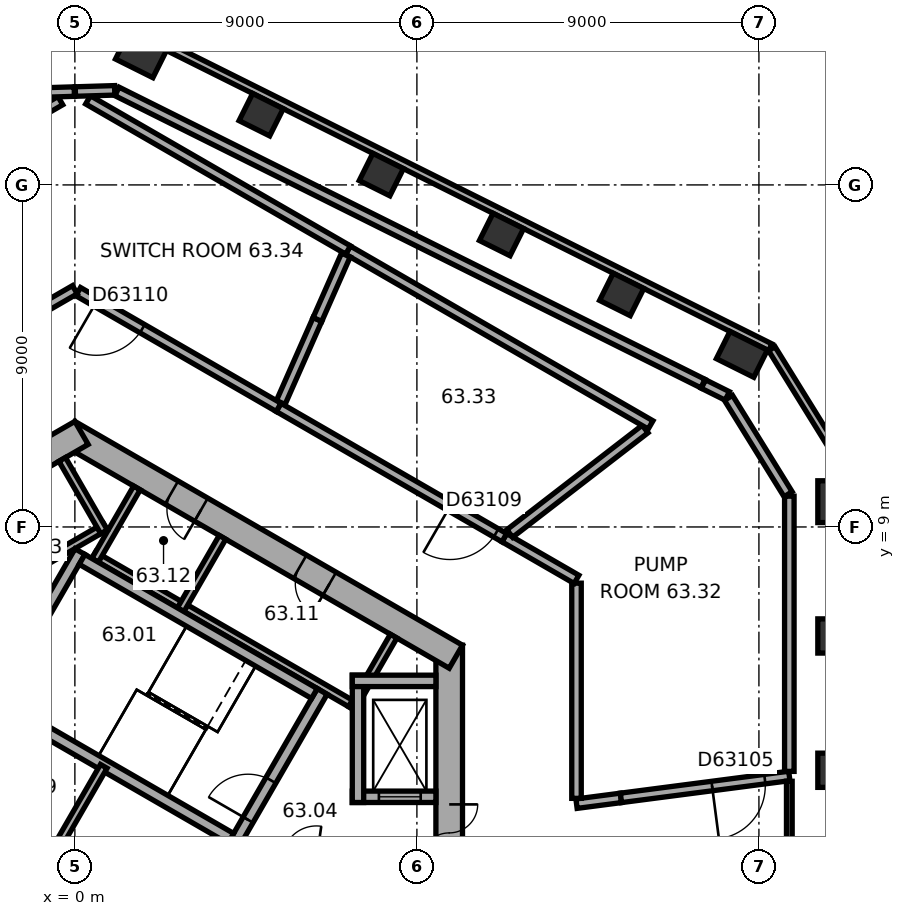
"""IFC4 building model, lengths in metres.
Left out: names, types, materials, properties, quantities, classifications, styles, units other than length and angle.
Written with IfcOpenShell. Run it as: python <this file> out.ifc"""

import sys

from ifc_helpers import new_model, si_unit, direction, frame, frame_2d, origin, origin_2d, place, context, subcontext, project, spatial, rectangle, extrude, element, fill, save


model = new_model("IFC4")
c1 = context("Model", 3, precision=1e-05, world=origin(), true_north=direction((0.0, 1.0)))
c2 = subcontext(c1, "Body", "Model", "MODEL_VIEW")
j1 = project(units=[si_unit("LENGTHUNIT", "METRE"), si_unit("PLANEANGLEUNIT", "RADIAN")], contexts=[c1])
p1 = place(None, origin())
s1 = spatial("IfcSite", under=j1, at=p1, CompositionType="ELEMENT")
p2 = place(p1, origin())
s2 = spatial("IfcBuilding", under=s1, at=p2, CompositionType="ELEMENT")
p3 = place(p2, frame((0.0, 0.0, 255.0)))
s3 = spatial("IfcBuildingStorey", under=s2, at=p3, CompositionType="ELEMENT", Elevation=255.0)
for number, where, z_axis, x_axis in (
    (1, (19.95, 2.598, 0.0), (0.0, 0.0, 1.0), (0.0, 1.0, 0.0)),
    (2, (19.95, 6.132, 0.0), (0.0, 0.0, 1.0), (0.0, 1.0, 0.0)),
):
    element("IfcColumn", number, at=place(p3, frame(where, z_axis=z_axis, x_axis=x_axis)), inside=s3, PredefinedType="COLUMN", context=c2, shape_type="SweptSolid", body=[
        extrude(rectangle(XDim=0.9, YDim=0.8, at=origin_2d()), origin(), (0.0, 0.0, 1.0), 4.8),
    ])
for number, where, z_axis, x_axis in (
    (3, (19.95, 9.665, 0.0), (0.0, 0.0, 1.0), (0.0, 1.0, 0.0)),
    (4, (17.552, 13.541, 0.0), (0.0, 0.0, 1.0), (-0.895, 0.446, 0.0)),
):
    element("IfcColumn", number, at=place(p3, frame(where, z_axis=z_axis, x_axis=x_axis)), inside=s3, PredefinedType="COLUMN", context=c2, shape_type="SweptSolid", body=[
        extrude(rectangle(XDim=1.1, YDim=0.8, at=origin_2d()), origin(), (0.0, 0.0, 1.0), 4.8),
    ])
for number, where, z_axis, x_axis in (
    (5, (14.389, 15.118, 0.0), (0.0, 0.0, 1.0), (-0.895, 0.446, 0.0)),
    (6, (11.227, 16.695, 0.0), (0.0, 0.0, 1.0), (-0.895, 0.446, 0.0)),
    (7, (8.064, 18.271, 0.0), (0.0, 0.0, 1.0), (-0.895, 0.446, 0.0)),
    (8, (4.902, 19.848, 0.0), (0.0, 0.0, 1.0), (-0.895, 0.446, 0.0)),
):
    element("IfcColumn", number, at=place(p3, frame(where, z_axis=z_axis, x_axis=x_axis)), inside=s3, PredefinedType="COLUMN", context=c2, shape_type="SweptSolid", body=[
        extrude(rectangle(XDim=0.9, YDim=0.8, at=origin_2d()), origin(), (0.0, 0.0, 1.0), 4.8),
    ])
p4 = place(p3, frame((1.74, 21.425, 0.0), z_axis=(0.0, 0.0, 1.0), x_axis=(-0.894934361602, 0.44619781311, 0.0)))
e9 = element("IfcColumn", 9, at=p4, inside=s3, PredefinedType="COLUMN", context=c2, shape_type="SweptSolid", body=[
    extrude(rectangle(XDim=1.1, YDim=0.8, at=origin_2d()), origin(), (0.0, 0.0, 1.0), 4.8),
])
p5 = place(p3, frame((9.85, -5.889, 0.0), z_axis=(0.0, 0.0, 1.0), x_axis=(0.0, 1.0, 0.0)))
e10 = element("IfcWall", 10, at=p5, inside=s3, PredefinedType="SHEAR", context=c2, shape_type="SweptSolid", body=[
    extrude(rectangle(XDim=11.778, YDim=0.7, at=frame_2d((5.889, 0.0))), origin(), (0.0, 0.0, 1.0), 4.8),
])
p6 = place(p5, frame((6.089, 0.0, 0.0)))
e11 = element("IfcOpeningElement", 11, at=p6, cuts=e10, PredefinedType="OPENING", context=c2, shape_type="SweptSolid", body=[
    extrude(rectangle(XDim=1.5, YDim=2.1, at=frame_2d((0.75, 1.05))), frame((0.0, 0.36, 0.0), z_axis=(0.0, -1.0, 0.0), x_axis=(1.0, 0.0, 0.0)), (0.0, 0.0, 1.0), 0.72),
])
p7 = place(p5, frame((2.939, 0.0, 0.0)))
e12 = element("IfcOpeningElement", 12, at=p7, cuts=e10, PredefinedType="OPENING", context=c2, shape_type="SweptSolid", body=[
    extrude(rectangle(XDim=0.9, YDim=2.1, at=frame_2d((0.45, 1.05))), frame((0.0, 0.36, 0.0), z_axis=(0.0, -1.0, 0.0), x_axis=(1.0, 0.0, 0.0)), (0.0, 0.0, 1.0), 0.72),
])
p8 = place(p3, frame((10.025, 5.586, 0.0), z_axis=(0.0, 0.0, 1.0), x_axis=(-0.866026453023, 0.499998182661, 0.0)))
e13 = element("IfcWall", 13, at=p8, inside=s3, PredefinedType="SHEAR", context=c2, shape_type="SweptSolid", body=[
    extrude(rectangle(XDim=11.778, YDim=0.7, at=frame_2d((5.889, 0.0))), origin(), (0.0, 0.0, 1.0), 4.8),
])
p9 = place(p8, frame((3.839, 0.0, 0.0)))
e14 = element("IfcOpeningElement", 14, at=p9, cuts=e13, PredefinedType="OPENING", context=c2, shape_type="SweptSolid", body=[
    extrude(rectangle(XDim=0.9, YDim=2.1, at=frame_2d((0.45, 1.05))), frame((0.0, 0.36, 0.0), z_axis=(0.0, -1.0, 0.0), x_axis=(1.0, 0.0, 0.0)), (0.0, 0.0, 1.0), 0.72),
])
p10 = place(p8, frame((7.739, 0.0, 0.0)))
e15 = element("IfcOpeningElement", 15, at=p10, cuts=e13, PredefinedType="OPENING", context=c2, shape_type="SweptSolid", body=[
    extrude(rectangle(XDim=0.9, YDim=2.1, at=frame_2d((0.45, 1.05))), frame((0.0, 0.36, 0.0), z_axis=(0.0, -1.0, 0.0), x_axis=(1.0, 0.0, 0.0)), (0.0, 0.0, 1.0), 0.72),
])
p11 = place(p3, frame((0.175, 11.475, 0.0), z_axis=(0.0, 0.0, 1.0), x_axis=(-0.866026453023, -0.499998182661, 0.0)))
e16 = element("IfcWall", 16, at=p11, inside=s3, PredefinedType="SHEAR", context=c2, shape_type="SweptSolid", body=[
    extrude(rectangle(XDim=11.778, YDim=0.7, at=frame_2d((5.889, 0.0))), origin(), (0.0, 0.0, 1.0), 4.8),
])
p12 = place(p11, frame((6.089, 0.0, 0.0)))
e17 = element("IfcOpeningElement", 17, at=p12, cuts=e16, PredefinedType="OPENING", context=c2, shape_type="SweptSolid", body=[
    extrude(rectangle(XDim=1.5, YDim=2.1, at=frame_2d((0.75, 1.05))), frame((0.0, 0.36, 0.0), z_axis=(0.0, -1.0, 0.0), x_axis=(1.0, 0.0, 0.0)), (0.0, 0.0, 1.0), 0.72),
])
p13 = place(p11, frame((1.639, 0.0, 0.0)))
e18 = element("IfcOpeningElement", 18, at=p13, cuts=e16, PredefinedType="OPENING", context=c2, shape_type="SweptSolid", body=[
    extrude(rectangle(XDim=0.9, YDim=2.1, at=frame_2d((0.45, 1.05))), frame((0.0, 0.36, 0.0), z_axis=(0.0, -1.0, 0.0), x_axis=(1.0, 0.0, 0.0)), (0.0, 0.0, 1.0), 0.72),
])
p14 = place(p11, frame((4.239, 0.0, 0.0)))
e19 = element("IfcOpeningElement", 19, at=p14, cuts=e16, PredefinedType="OPENING", context=c2, shape_type="SweptSolid", body=[
    extrude(rectangle(XDim=0.9, YDim=2.1, at=frame_2d((0.45, 1.05))), frame((0.0, 0.36, 0.0), z_axis=(0.0, -1.0, 0.0), x_axis=(1.0, 0.0, 0.0)), (0.0, 0.0, 1.0), 0.72),
])
p15 = place(p3, frame((20.435, 10.304, 0.0), z_axis=(0.0, 0.0, 1.0), x_axis=(-0.526202661606, 0.850359194058, 0.0)))
e20 = element("IfcWall", 20, at=p15, inside=s3, PredefinedType="STANDARD", context=c2, shape_type="SweptSolid", body=[
    extrude(rectangle(XDim=3.983, YDim=0.2, at=frame_2d((1.991, 0.0))), origin(), (0.0, 0.0, 1.0), 4.8),
])
p16 = place(p3, frame((18.299, 13.727, 0.0), z_axis=(0.0, 0.0, 1.0), x_axis=(-0.894934554817, 0.44619742558, 0.0)))
e21 = element("IfcWall", 21, at=p16, inside=s3, PredefinedType="STANDARD", context=c2, shape_type="SweptSolid", body=[
    extrude(rectangle(XDim=18.841, YDim=0.2, at=frame_2d((9.421, 0.0))), origin(), (0.0, 0.0, 1.0), 4.8),
])
p17 = place(p3, frame((7.424, 4.259, 0.0), z_axis=(0.0, 0.0, 1.0), x_axis=(-0.866026010844, 0.49999894854, 0.0)))
e22 = element("IfcWall", 22, at=p17, inside=s3, PredefinedType="PARTITIONING", context=c2, shape_type="SweptSolid", body=[
    extrude(rectangle(XDim=8.0, YDim=0.2, at=frame_2d((4.0, 0.0))), origin(), (0.0, 0.0, 1.0), 4.52),
])
for number, where, z_axis, x_axis in (
    (23, (7.287, 4.222, 0.0), (0.0, 0.0, 1.0), (0.5, 0.866, 0.0)),
    (24, (2.784, 6.822, 0.0), (0.0, 0.0, 1.0), (0.5, 0.866, 0.0)),
    (25, (0.532, 8.122, 0.0), (0.0, 0.0, 1.0), (0.5, 0.866, 0.0)),
):
    element("IfcWall", number, at=place(p3, frame(where, z_axis=z_axis, x_axis=x_axis)), inside=s3, PredefinedType="PARTITIONING", context=c2, shape_type="SweptSolid", body=[
        extrude(rectangle(XDim=2.2, YDim=0.2, at=frame_2d((1.1, 0.0))), origin(), (0.0, 0.0, 1.0), 4.52),
    ])
p18 = place(p3, frame((0.803, 9.009, 0.0), z_axis=(0.0, 0.0, 1.0), x_axis=(-0.866028230842, -0.499995103361, 0.0)))
e26 = element("IfcWall", 26, at=p18, inside=s3, PredefinedType="PARTITIONING", context=c2, shape_type="SweptSolid", body=[
    extrude(rectangle(XDim=5.4, YDim=0.2, at=frame_2d((2.7, 0.0))), origin(), (0.0, 0.0, 1.0), 4.52),
])
p19 = place(p3, frame((0.767, 8.872, 0.0), z_axis=(0.0, 0.0, 1.0), x_axis=(-0.499994660107, 0.866028486751, 0.0)))
e27 = element("IfcWall", 27, at=p19, inside=s3, PredefinedType="PARTITIONING", context=c2, shape_type="SweptSolid", body=[
    extrude(rectangle(XDim=2.2, YDim=0.2, at=frame_2d((1.1, 0.0))), origin(), (0.0, 0.0, 1.0), 4.52),
])
p20 = place(p3, frame((4.158, 0.602, 0.0), z_axis=(0.0, 0.0, 1.0), x_axis=(0.499977259774, 0.866038532462, 0.0)))
e28 = element("IfcWall", 28, at=p20, inside=s3, PredefinedType="SHEAR", context=c2, shape_type="SweptSolid", body=[
    extrude(rectangle(XDim=4.7, YDim=0.3, at=frame_2d((2.35, 0.0))), origin(), (0.0, 0.0, 1.0), 4.52),
])
p21 = place(p20, frame((0.8, 0.0, 0.0)))
e29 = element("IfcOpeningElement", 29, at=p21, cuts=e28, PredefinedType="OPENING", context=c2, shape_type="SweptSolid", body=[
    extrude(rectangle(XDim=1.2, YDim=2.1, at=frame_2d((0.6, 1.05))), frame((0.0, 0.16, 0.0), z_axis=(0.0, -1.0, 0.0), x_axis=(1.0, 0.0, 0.0)), (0.0, 0.0, 1.0), 0.32),
])
p22 = place(p3, frame((-2.216, 4.282, 0.0), z_axis=(0.0, 0.0, 1.0), x_axis=(0.499977259774, 0.866038532462, 0.0)))
e30 = element("IfcWall", 30, at=p22, inside=s3, PredefinedType="SHEAR", context=c2, shape_type="SweptSolid", body=[
    extrude(rectangle(XDim=4.7, YDim=0.3, at=frame_2d((2.35, 0.0))), origin(), (0.0, 0.0, 1.0), 4.52),
])
for number, where, z_axis, x_axis in (
    (31, (4.103, 0.807, 0.0), (0.0, 0.0, 1.0), (-0.866, 0.5, 0.0)),
    (32, (6.303, 4.617, 0.0), (0.0, 0.0, 1.0), (-0.866, 0.5, 0.0)),
):
    element("IfcWall", number, at=place(p3, frame(where, z_axis=z_axis, x_axis=x_axis)), inside=s3, PredefinedType="SHEAR", context=c2, shape_type="SweptSolid", body=[
        extrude(rectangle(XDim=7.06, YDim=0.3, at=frame_2d((3.53, 0.0))), origin(), (0.0, 0.0, 1.0), 4.52),
    ])
p23 = place(p3, frame((7.3, 1.9, 0.0), z_axis=(0.0, 0.0, 1.0), x_axis=(1.0, 0.0, 0.0)))
e33 = element("IfcWall", 33, at=p23, inside=s3, PredefinedType="SHEAR", context=c2, shape_type="SweptSolid", body=[
    extrude(rectangle(XDim=2.2, YDim=0.3, at=frame_2d((1.1, 0.0))), origin(), (0.0, 0.0, 1.0), 4.52),
])
p24 = place(p23, frame((0.7, 0.0, 0.0)))
e34 = element("IfcOpeningElement", 34, at=p24, cuts=e33, PredefinedType="OPENING", context=c2, shape_type="SweptSolid", body=[
    extrude(rectangle(XDim=1.1, YDim=2.1, at=frame_2d((0.55, 1.05))), frame((0.0, 0.16, 0.0), z_axis=(0.0, -1.0, 0.0), x_axis=(1.0, 0.0, 0.0)), (0.0, 0.0, 1.0), 0.32),
])
p25 = place(p3, frame((7.45, 1.75, 0.0), z_axis=(0.0, 0.0, 1.0), x_axis=(0.0, 1.0, 0.0)))
e35 = element("IfcWall", 35, at=p25, inside=s3, PredefinedType="SHEAR", context=c2, shape_type="SweptSolid", body=[
    extrude(rectangle(XDim=3.35, YDim=0.3, at=frame_2d((1.675, 0.0))), origin(), (0.0, 0.0, 1.0), 4.52),
])
p26 = place(p3, frame((7.3, 4.95, 0.0), z_axis=(0.0, 0.0, 1.0), x_axis=(1.0, 0.0, 0.0)))
e36 = element("IfcWall", 36, at=p26, inside=s3, PredefinedType="SHEAR", context=c2, shape_type="SweptSolid", body=[
    extrude(rectangle(XDim=2.2, YDim=0.3, at=frame_2d((1.1, 0.0))), origin(), (0.0, 0.0, 1.0), 4.52),
])
p27 = place(p3, frame((-0.86, -0.104, 0.0), z_axis=(0.0, 0.0, 1.0), x_axis=(0.500029011134, 0.866008653551, 0.0)))
e37 = element("IfcWall", 37, at=p27, inside=s3, PredefinedType="PARTITIONING", context=c2, shape_type="SweptSolid", body=[
    extrude(rectangle(XDim=3.24, YDim=0.2, at=frame_2d((1.62, 0.0))), origin(), (0.0, 0.0, 1.0), 4.52),
])
p28 = place(p3, frame((14.369, 1.872, 0.0), z_axis=(0.0, 0.0, 1.0), x_axis=(-0.991594638447, -0.129383434035, 0.0)))
e38 = element("IfcWall", 38, at=p28, inside=s3, PredefinedType="SOLIDWALL", context=c2, shape_type="SweptSolid", body=[
    extrude(rectangle(XDim=1.179, YDim=0.25, at=frame_2d((0.59, 0.0))), origin(), (0.0, 0.0, 1.0), 3.6),
])
p29 = place(p3, frame((14.369, 1.872, 0.0), z_axis=(0.0, 0.0, 1.0), x_axis=(0.991629331996, 0.129117264244, 0.0)))
e39 = element("IfcWall", 39, at=p29, inside=s3, PredefinedType="SOLIDWALL", context=c2, shape_type="SweptSolid", body=[
    extrude(rectangle(XDim=4.468, YDim=0.25, at=frame_2d((2.234, 0.0))), origin(), (0.0, 0.0, 1.0), 3.6),
])
p30 = place(p29, frame((2.418, 0.0, 0.0)))
e40 = element("IfcOpeningElement", 40, at=p30, cuts=e39, PredefinedType="OPENING", context=c2, shape_type="SweptSolid", body=[
    extrude(rectangle(XDim=1.4, YDim=2.1, at=frame_2d((0.7, 1.05))), frame((0.0, 0.135, 0.0), z_axis=(0.0, -1.0, 0.0), x_axis=(1.0, 0.0, 0.0)), (0.0, 0.0, 1.0), 0.27),
])
p31 = place(p3, frame((18.8, 2.309, 0.0), z_axis=(0.0, 0.0, 1.0), x_axis=(0.0, -1.0, 0.0)))
e41 = element("IfcWall", 41, at=p31, inside=s3, PredefinedType="PARTITIONING", context=c2, shape_type="SweptSolid", body=[
    extrude(rectangle(XDim=9.85, YDim=0.15, at=frame_2d((4.925, 0.0))), origin(), (0.0, 0.0, 1.0), 4.02),
])
p32 = place(p3, frame((13.2, 7.521, 0.0), z_axis=(0.0, 0.0, 1.0), x_axis=(0.0, -1.0, 0.0)))
e42 = element("IfcWall", 42, at=p32, inside=s3, PredefinedType="SOLIDWALL", context=c2, shape_type="SweptSolid", body=[
    extrude(rectangle(XDim=5.662, YDim=0.25, at=frame_2d((2.831, 0.0))), origin(), (0.0, 0.0, 1.0), 4.52),
])
p33 = place(p3, frame((13.2, 7.621, 0.0), z_axis=(0.0, 0.0, 1.0), x_axis=(-0.866022502605, 0.500005024956, 0.0)))
e43 = element("IfcWall", 43, at=p33, inside=s3, PredefinedType="SOLIDWALL", context=c2, shape_type="SweptSolid", body=[
    extrude(rectangle(XDim=2.194, YDim=0.25, at=frame_2d((1.097, 0.0))), origin(), (0.0, 0.0, 1.0), 4.52),
])
p34 = place(p3, frame((11.443, 8.828, 0.0), z_axis=(0.0, 0.0, 1.0), x_axis=(0.791689291754, 0.610923943976, 0.0)))
e44 = element("IfcWall", 44, at=p34, inside=s3, PredefinedType="SOLIDWALL", context=c2, shape_type="SweptSolid", body=[
    extrude(rectangle(XDim=4.5, YDim=0.25, at=frame_2d((2.25, 0.0))), origin(), (0.0, 0.0, 1.0), 3.6),
])
p35 = place(p3, frame((18.8, 9.811, 0.0), z_axis=(0.0, 0.0, 1.0), x_axis=(0.0, -1.0, 0.0)))
e45 = element("IfcWall", 45, at=p35, inside=s3, PredefinedType="SOLIDWALL", context=c2, shape_type="SweptSolid", body=[
    extrude(rectangle(XDim=7.242, YDim=0.25, at=frame_2d((3.621, 0.0))), origin(), (0.0, 0.0, 1.0), 4.02),
])
p36 = place(p3, frame((15.149, 11.685, 0.0), z_axis=(0.0, 0.0, 1.0), x_axis=(-0.86600739608, 0.500031188962, 0.0)))
e46 = element("IfcWall", 46, at=p36, inside=s3, PredefinedType="SOLIDWALL", context=c2, shape_type="SweptSolid", body=[
    extrude(rectangle(XDim=9.195, YDim=0.25, at=frame_2d((4.598, 0.0))), origin(), (0.0, 0.0, 1.0), 4.52),
])
p37 = place(p3, frame((5.361, 12.147, 0.0), z_axis=(0.0, 0.0, 1.0), x_axis=(0.86601958666, -0.500010075419, 0.0)))
e47 = element("IfcWall", 47, at=p37, inside=s3, PredefinedType="SOLIDWALL", context=c2, shape_type="SweptSolid", body=[
    extrude(rectangle(XDim=6.858, YDim=0.25, at=frame_2d((3.429, 0.0))), origin(), (0.0, 0.0, 1.0), 4.52),
])
p38 = place(p37, frame((5.208, 0.0, 0.0)))
e48 = element("IfcOpeningElement", 48, at=p38, cuts=e47, PredefinedType="OPENING", context=c2, shape_type="SweptSolid", body=[
    extrude(rectangle(XDim=1.4, YDim=2.1, at=frame_2d((0.7, 1.05))), frame((0.0, 0.135, 0.0), z_axis=(0.0, -1.0, 0.0), x_axis=(1.0, 0.0, 0.0)), (0.0, 0.0, 1.0), 0.27),
])
p39 = place(p3, frame((17.199, 12.396, 0.0), z_axis=(0.0, 0.0, 1.0), x_axis=(0.526261572614, -0.850322737077, 0.0)))
e49 = element("IfcWall", 49, at=p39, inside=s3, PredefinedType="SOLIDWALL", context=c2, shape_type="SweptSolid", body=[
    extrude(rectangle(XDim=2.981, YDim=0.25, at=frame_2d((1.491, 0.0))), origin(), (0.0, 0.0, 1.0), 4.52),
])
p40 = place(p3, frame((16.54, 12.76, 0.0), z_axis=(0.0, 0.0, 1.0), x_axis=(0.894983252618, -0.446099739446, 0.0)))
e50 = element("IfcWall", 50, at=p40, inside=s3, PredefinedType="SOLIDWALL", context=c2, shape_type="SweptSolid", body=[
    extrude(rectangle(XDim=0.702, YDim=0.25, at=frame_2d((0.351, 0.0))), origin(), (0.0, 0.0, 1.0), 4.52),
])
p41 = place(p3, frame((6.383, 14.46, 0.0), z_axis=(0.0, 0.0, 1.0), x_axis=(-0.403984880166, -0.914765662122, 0.0)))
e51 = element("IfcWall", 51, at=p41, inside=s3, PredefinedType="SOLIDWALL", context=c2, shape_type="SweptSolid", body=[
    extrude(rectangle(XDim=2.389, YDim=0.25, at=frame_2d((1.194, 0.0))), origin(), (0.0, 0.0, 1.0), 3.6),
])
p42 = place(p3, frame((0.087, 15.192, 0.0), z_axis=(0.0, 0.0, 1.0), x_axis=(0.866044067064, -0.499967672858, 0.0)))
e52 = element("IfcWall", 52, at=p42, inside=s3, PredefinedType="SOLIDWALL", context=c2, shape_type="SweptSolid", body=[
    extrude(rectangle(XDim=6.09, YDim=0.25, at=frame_2d((3.045, 0.0))), origin(), (0.0, 0.0, 1.0), 4.52),
])
p43 = place(p42, frame((0.55, 0.0, 0.0)))
e53 = element("IfcOpeningElement", 53, at=p43, cuts=e52, PredefinedType="OPENING", context=c2, shape_type="SweptSolid", body=[
    extrude(rectangle(XDim=1.4, YDim=2.1, at=frame_2d((0.7, 1.05))), frame((0.0, 0.135, 0.0), z_axis=(0.0, -1.0, 0.0), x_axis=(1.0, 0.0, 0.0)), (0.0, 0.0, 1.0), 0.27),
])
p44 = place(p3, frame((0.0, 15.242, 0.0), z_axis=(0.0, 0.0, 1.0), x_axis=(-0.866057993361, -0.499943548949, 0.0)))
e54 = element("IfcWall", 54, at=p44, inside=s3, PredefinedType="SOLIDWALL", context=c2, shape_type="SweptSolid", body=[
    extrude(rectangle(XDim=2.326, YDim=0.25, at=frame_2d((1.163, 0.0))), origin(), (0.0, 0.0, 1.0), 4.52),
])
p45 = place(p3, frame((7.13, 16.155, 0.0), z_axis=(0.0, 0.0, 1.0), x_axis=(-0.403776512369, -0.914857654534, 0.0)))
e55 = element("IfcWall", 55, at=p45, inside=s3, PredefinedType="SOLIDWALL", context=c2, shape_type="SweptSolid", body=[
    extrude(rectangle(XDim=1.852, YDim=0.25, at=frame_2d((0.926, 0.0))), origin(), (0.0, 0.0, 1.0), 3.6),
])
p46 = place(p3, frame((-2.597, 18.938, 0.0), z_axis=(0.0, 0.0, 1.0), x_axis=(0.866037761476, 0.49997859524, 0.0)))
e56 = element("IfcWall", 56, at=p46, inside=s3, PredefinedType="SOLIDWALL", context=c2, shape_type="SweptSolid", body=[
    extrude(rectangle(XDim=2.558, YDim=0.25, at=frame_2d((1.279, 0.0))), origin(), (0.0, 0.0, 1.0), 4.52),
])
p47 = place(p3, frame((0.346, 20.238, 0.0), z_axis=(0.0, 0.0, 1.0), x_axis=(0.866038426532, -0.499977443261, 0.0)))
e57 = element("IfcWall", 57, at=p47, inside=s3, PredefinedType="SOLIDWALL", context=c2, shape_type="SweptSolid", body=[
    extrude(rectangle(XDim=7.901, YDim=0.25, at=frame_2d((3.951, 0.0))), origin(), (0.0, 0.0, 1.0), 4.52),
])
p48 = place(p3, frame((-2.296, 20.386, 0.0), z_axis=(0.0, 0.0, 1.0), x_axis=(0.999535073745, 0.030489938565, 0.0)))
e58 = element("IfcWall", 58, at=p48, inside=s3, PredefinedType="SOLIDWALL", context=c2, shape_type="SweptSolid", body=[
    extrude(rectangle(XDim=2.282, YDim=0.25, at=frame_2d((1.141, 0.0))), origin(), (0.0, 0.0, 1.0), 4.52),
])
p49 = place(p3, frame((0.013, 20.457, 0.0), z_axis=(0.0, 0.0, 1.0), x_axis=(0.999537058772, 0.030424794852, 0.0)))
e59 = element("IfcWall", 59, at=p49, inside=s3, PredefinedType="SOLIDWALL", context=c2, shape_type="SweptSolid", body=[
    extrude(rectangle(XDim=1.035, YDim=0.25, at=frame_2d((0.518, 0.0))), origin(), (0.0, 0.0, 1.0), 4.52),
])
p50 = place(p3, frame((1.108, 20.46, 0.0), z_axis=(0.0, 0.0, 1.0), x_axis=(0.894936689972, -0.446193143091, 0.0)))
e60 = element("IfcWall", 60, at=p50, inside=s3, PredefinedType="SOLIDWALL", context=c2, shape_type="SweptSolid", body=[
    extrude(rectangle(XDim=17.231, YDim=0.25, at=frame_2d((8.615, 0.0))), origin(), (0.0, 0.0, 1.0), 4.02),
])
p51 = place(p6, origin())
e61 = element("IfcDoor", 61, at=p51, inside=s3, OperationType="DOUBLE_DOOR_SINGLE_SWING", PredefinedType="DOOR", context=c2, shape_type="SweptSolid", body=[
    extrude(rectangle(XDim=1.5, YDim=2.1, at=frame_2d((0.75, 1.05))), frame((0.0, 0.025, 0.0), z_axis=(0.0, -1.0, 0.0), x_axis=(1.0, 0.0, 0.0)), (0.0, 0.0, 1.0), 0.05),
])
fill(e11, e61)
p52 = place(p21, origin())
e62 = element("IfcDoor", 62, at=p52, inside=s3, OperationType="SINGLE_SWING_RIGHT", PredefinedType="DOOR", context=c2, shape_type="SweptSolid", body=[
    extrude(rectangle(XDim=1.2, YDim=2.1, at=frame_2d((0.6, 1.05))), frame((0.0, 0.025, 0.0), z_axis=(0.0, -1.0, 0.0), x_axis=(1.0, 0.0, 0.0)), (0.0, 0.0, 1.0), 0.05),
])
fill(e29, e62)
p53 = place(p9, origin())
e63 = element("IfcDoor", 63, at=p53, inside=s3, OperationType="SINGLE_SWING_LEFT", PredefinedType="DOOR", context=c2, shape_type="SweptSolid", body=[
    extrude(rectangle(XDim=0.9, YDim=2.1, at=frame_2d((0.45, 1.05))), frame((0.0, 0.025, 0.0), z_axis=(0.0, -1.0, 0.0), x_axis=(1.0, 0.0, 0.0)), (0.0, 0.0, 1.0), 0.05),
])
fill(e14, e63)
p54 = place(p10, origin())
e64 = element("IfcDoor", 64, at=p54, inside=s3, OperationType="SINGLE_SWING_LEFT", PredefinedType="DOOR", context=c2, shape_type="SweptSolid", body=[
    extrude(rectangle(XDim=0.9, YDim=2.1, at=frame_2d((0.45, 1.05))), frame((0.0, 0.025, 0.0), z_axis=(0.0, -1.0, 0.0), x_axis=(1.0, 0.0, 0.0)), (0.0, 0.0, 1.0), 0.05),
])
fill(e15, e64)
p55 = place(p24, origin())
e65 = element("IfcDoor", 65, at=p55, inside=s3, OperationType="DOUBLE_DOOR_SLIDING", PredefinedType="DOOR", context=c2, shape_type="SweptSolid", body=[
    extrude(rectangle(XDim=1.1, YDim=2.1, at=frame_2d((0.55, 1.05))), frame((0.0, 0.025, 0.0), z_axis=(0.0, -1.0, 0.0), x_axis=(1.0, 0.0, 0.0)), (0.0, 0.0, 1.0), 0.05),
])
fill(e34, e65)
p56 = place(p30, origin())
e66 = element("IfcDoor", 66, at=p56, inside=s3, OperationType="SINGLE_SWING_LEFT", PredefinedType="DOOR", context=c2, shape_type="SweptSolid", body=[
    extrude(rectangle(XDim=1.4, YDim=2.1, at=frame_2d((0.7, 1.05))), frame((0.0, 0.025, 0.0), z_axis=(0.0, -1.0, 0.0), x_axis=(1.0, 0.0, 0.0)), (0.0, 0.0, 1.0), 0.05),
])
fill(e40, e66)
p57 = place(p38, origin())
e67 = element("IfcDoor", 67, at=p57, inside=s3, OperationType="SINGLE_SWING_LEFT", PredefinedType="DOOR", context=c2, shape_type="SweptSolid", body=[
    extrude(rectangle(XDim=1.4, YDim=2.1, at=frame_2d((0.7, 1.05))), frame((0.0, 0.025, 0.0), z_axis=(0.0, -1.0, 0.0), x_axis=(1.0, 0.0, 0.0)), (0.0, 0.0, 1.0), 0.05),
])
fill(e48, e67)
p58 = place(p43, origin())
e68 = element("IfcDoor", 68, at=p58, inside=s3, OperationType="SINGLE_SWING_LEFT", PredefinedType="DOOR", context=c2, shape_type="SweptSolid", body=[
    extrude(rectangle(XDim=1.4, YDim=2.1, at=frame_2d((0.7, 1.05))), frame((0.0, 0.025, 0.0), z_axis=(0.0, -1.0, 0.0), x_axis=(1.0, 0.0, 0.0)), (0.0, 0.0, 1.0), 0.05),
])
fill(e53, e68)
save(model, sys.argv[1])
